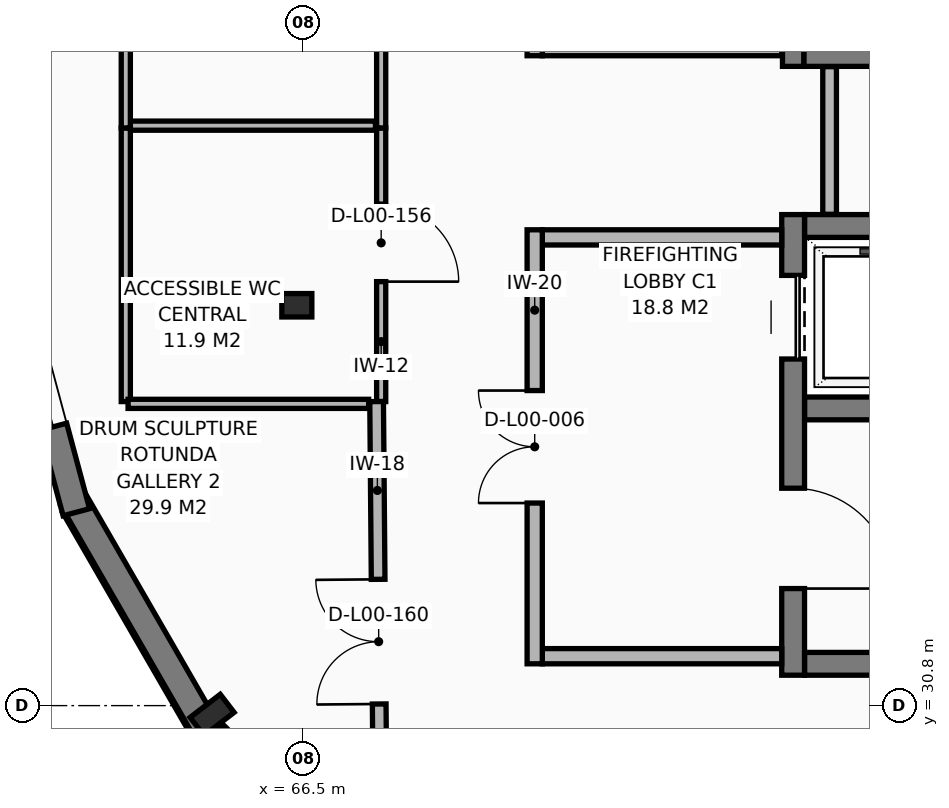
"""IFC4 building model, lengths in metres.
Left out: names, types, materials, properties, quantities, classifications, styles, units other than length and angle.
Written with IfcOpenShell. Run it as: python <this file> out.ifc"""

import sys

from ifc_helpers import new_model, si_unit, direction, frame, frame_2d, origin, origin_2d, place, context, subcontext, project, spatial, rectangle, i_section, extrude, element, fill, save


model = new_model("IFC4")
c1 = context("Model", 3, precision=1e-05, world=origin(), true_north=direction((0.0, 1.0)))
c2 = subcontext(c1, "Body", "Model", "MODEL_VIEW")
j1 = project(units=[si_unit("LENGTHUNIT", "METRE"), si_unit("PLANEANGLEUNIT", "RADIAN")], contexts=[c1])
p1 = place(None, origin())
s1 = spatial("IfcSite", under=j1, at=p1, CompositionType="ELEMENT")
p2 = place(p1, origin())
s2 = spatial("IfcBuilding", under=s1, at=p2, CompositionType="ELEMENT")
p3 = place(p2, origin())
s3 = spatial("IfcBuildingStorey", under=s2, at=p3, CompositionType="ELEMENT", Elevation=0.0)
p4 = place(p3, frame((65.305, 30.677, 0.0), z_axis=(0.0, 0.0, 1.0), x_axis=(-0.793353340291, -0.608761429009, 0.0)))
e1 = element("IfcColumn", 1, at=p4, inside=s3, PredefinedType="COLUMN", context=c2, shape_type="SweptSolid", body=[
    extrude(i_section(OverallWidth=0.3, OverallDepth=0.5, WebThickness=0.014, FlangeThickness=0.028, FilletRadius=0.027, at=origin_2d()), origin(), (0.0, 0.0, 1.0), 5.1),
])
p5 = place(p3, frame((66.42, 36.067, 0.0), z_axis=(0.0, 0.0, 1.0), x_axis=(1.0, 0.0, 0.0)))
e2 = element("IfcColumn", 2, at=p5, inside=s3, PredefinedType="COLUMN", context=c2, shape_type="SweptSolid", body=[
    extrude(i_section(OverallWidth=0.308, OverallDepth=0.395, WebThickness=0.021, FlangeThickness=0.04, FilletRadius=0.027, at=origin_2d()), origin(), (0.0, 0.0, 1.0), 5.1),
])
p6 = place(p3, frame((67.702, 28.044, 0.0), z_axis=(0.0, 0.0, 1.0), x_axis=(-0.707140892322, 0.707072668406, 0.0)))
e3 = element("IfcWall", 3, at=p6, inside=s3, PredefinedType="SOLIDWALL", context=c2, shape_type="SweptSolid", body=[
    extrude(rectangle(XDim=3.579, YDim=0.36, at=frame_2d((1.789, 0.0))), origin(), (0.0, 0.0, 1.0), 4.88),
])
p7 = place(p6, frame((1.164, 0.0, 0.85)))
e4 = element("IfcOpeningElement", 4, at=p7, cuts=e3, PredefinedType="OPENING", context=c2, shape_type="SweptSolid", body=[
    extrude(rectangle(XDim=1.25, YDim=1.7, at=frame_2d((0.625, 0.85))), frame((0.0, 0.19, 0.0), z_axis=(0.0, -1.0, 0.0), x_axis=(1.0, 0.0, 0.0)), (0.0, 0.0, 1.0), 0.38),
])
p8 = place(p3, frame((65.262, 30.419, 0.0), z_axis=(0.0, 0.0, 1.0), x_axis=(-0.500005919159, 0.866021986329, 0.0)))
e5 = element("IfcWall", 5, at=p8, inside=s3, PredefinedType="SOLIDWALL", context=c2, shape_type="SweptSolid", body=[
    extrude(rectangle(XDim=3.579, YDim=0.36, at=frame_2d((1.789, 0.0))), origin(), (0.0, 0.0, 1.0), 4.88),
])
p9 = place(p3, frame((63.519, 33.344, 0.0), z_axis=(0.0, 0.0, 1.0), x_axis=(-0.258779281586, 0.965936480014, 0.0)))
e6 = element("IfcWall", 6, at=p9, inside=s3, PredefinedType="SOLIDWALL", context=c2, shape_type="SweptSolid", body=[
    extrude(rectangle(XDim=3.578, YDim=0.36, at=frame_2d((1.789, 0.0))), origin(), (0.0, 0.0, 1.0), 4.88),
])
p10 = place(p9, frame((1.164, 0.0, 0.85)))
e7 = element("IfcOpeningElement", 7, at=p10, cuts=e6, PredefinedType="OPENING", context=c2, shape_type="SweptSolid", body=[
    extrude(rectangle(XDim=1.25, YDim=1.7, at=frame_2d((0.625, 0.85))), frame((0.0, 0.19, 0.0), z_axis=(0.0, -1.0, 0.0), x_axis=(1.0, 0.0, 0.0)), (0.0, 0.0, 1.0), 0.38),
])
for number, where, z_axis, x_axis in (
    (8, (73.1, 31.35, 0.0), (0.0, 0.0, 1.0), (1.0, 0.0, 0.0)),
    (9, (80.8, 34.71, 0.0), (0.0, 0.0, 1.0), (-1.0, 0.0, 0.0)),
):
    element("IfcWall", number, at=place(p3, frame(where, z_axis=z_axis, x_axis=x_axis)), inside=s3, PredefinedType="SHEAR", context=c2, shape_type="SweptSolid", body=[
        extrude(rectangle(XDim=7.7, YDim=0.3, at=frame_2d((3.85, 0.0))), origin(), (0.0, 0.0, 1.0), 4.88),
    ])
p11 = place(p3, frame((76.3, 37.11, 0.0), z_axis=(0.0, 0.0, 1.0), x_axis=(-1.0, 0.0, 0.0)))
e10 = element("IfcWall", 10, at=p11, inside=s3, PredefinedType="SHEAR", context=c2, shape_type="SweptSolid", body=[
    extrude(rectangle(XDim=3.2, YDim=0.3, at=frame_2d((1.6, 0.0))), origin(), (0.0, 0.0, 1.0), 4.88),
])
p12 = place(p3, frame((72.95, 37.26, 0.0), z_axis=(0.0, 0.0, 1.0), x_axis=(0.0, -1.0, 0.0)))
e11 = element("IfcWall", 11, at=p12, inside=s3, PredefinedType="SHEAR", context=c2, shape_type="SweptSolid", body=[
    extrude(rectangle(XDim=6.06, YDim=0.3, at=frame_2d((3.03, 0.0))), origin(), (0.0, 0.0, 1.0), 4.88),
])
p13 = place(p12, frame((0.8, 0.0, 0.0)))
e12 = element("IfcOpeningElement", 12, at=p13, cuts=e11, PredefinedType="OPENING", context=c2, shape_type="SweptSolid", body=[
    extrude(rectangle(XDim=1.1, YDim=2.12, at=frame_2d((0.55, 1.06))), frame((0.0, 0.16, 0.0), z_axis=(0.0, -1.0, 0.0), x_axis=(1.0, 0.0, 0.0)), (0.0, 0.0, 1.0), 0.32),
])
p14 = place(p12, frame((3.6, 0.0, 0.0)))
e13 = element("IfcOpeningElement", 13, at=p14, cuts=e11, PredefinedType="OPENING", context=c2, shape_type="SweptSolid", body=[
    extrude(rectangle(XDim=1.32, YDim=2.12, at=frame_2d((0.66, 1.06))), frame((0.0, 0.16, 0.0), z_axis=(0.0, -1.0, 0.0), x_axis=(1.0, 0.0, 0.0)), (0.0, 0.0, 1.0), 0.32),
])
p15 = place(p3, frame((69.65, 31.45, 0.0), z_axis=(0.0, 0.0, 1.0), x_axis=(1.0, 0.0, 0.0)))
e14 = element("IfcWall", 14, at=p15, inside=s3, PredefinedType="PARTITIONING", context=c2, shape_type="SweptSolid", body=[
    extrude(rectangle(XDim=3.15, YDim=0.2, at=frame_2d((1.575, 0.0))), origin(), (0.0, 0.0, 1.0), 4.27),
])
p16 = place(p3, frame((72.8, 36.96, 0.0), z_axis=(0.0, 0.0, 1.0), x_axis=(-1.0, 0.0, 0.0)))
e15 = element("IfcWall", 15, at=p16, inside=s3, PredefinedType="PARTITIONING", context=c2, shape_type="SweptSolid", body=[
    extrude(rectangle(XDim=3.15, YDim=0.2, at=frame_2d((1.575, 0.0))), origin(), (0.0, 0.0, 1.0), 4.88),
])
p17 = place(p3, frame((69.55, 31.35, 0.0), z_axis=(0.0, 0.0, 1.0), x_axis=(0.0, 1.0, 0.0)))
e16 = element("IfcWall", 16, at=p17, inside=s3, PredefinedType="PARTITIONING", context=c2, shape_type="SweptSolid", body=[
    extrude(rectangle(XDim=5.71, YDim=0.2, at=frame_2d((2.855, 0.0))), origin(), (0.0, 0.0, 1.0), 4.27),
])
p18 = place(p17, frame((2.115, 0.0, 0.0)))
e17 = element("IfcOpeningElement", 17, at=p18, cuts=e16, PredefinedType="OPENING", context=c2, shape_type="SweptSolid", body=[
    extrude(rectangle(XDim=1.48, YDim=2.15, at=frame_2d((0.74, 1.075))), frame((0.0, 0.11, 0.0), z_axis=(0.0, -1.0, 0.0), x_axis=(1.0, 0.0, 0.0)), (0.0, 0.0, 1.0), 0.22),
])
p19 = place(p3, frame((73.09, 39.35, 0.0), z_axis=(0.0, 0.0, 1.0), x_axis=(1.0, 0.0, 0.0)))
e18 = element("IfcWall", 18, at=p19, inside=s3, PredefinedType="SHEAR", context=c2, shape_type="SweptSolid", body=[
    extrude(rectangle(XDim=7.7, YDim=0.28, at=frame_2d((3.85, 0.0))), origin(), (0.0, 0.0, 1.0), 4.88),
])
p20 = place(p3, frame((72.95, 45.25, 0.0), z_axis=(0.0, 0.0, 1.0), x_axis=(0.0, -1.0, 0.0)))
e19 = element("IfcWall", 19, at=p20, inside=s3, PredefinedType="SHEAR", context=c2, shape_type="SweptSolid", body=[
    extrude(rectangle(XDim=6.04, YDim=0.28, at=frame_2d((3.02, 0.0))), origin(), (0.0, 0.0, 1.0), 4.88),
])
p21 = place(p20, frame((0.8, 0.0, 0.0)))
e20 = element("IfcOpeningElement", 20, at=p21, cuts=e19, PredefinedType="OPENING", context=c2, shape_type="SweptSolid", body=[
    extrude(rectangle(XDim=1.1, YDim=2.12, at=frame_2d((0.55, 1.06))), frame((0.0, 0.15, 0.0), z_axis=(0.0, -1.0, 0.0), x_axis=(1.0, 0.0, 0.0)), (0.0, 0.0, 1.0), 0.3),
])
p22 = place(p20, frame((3.6, 0.0, 0.0)))
e21 = element("IfcOpeningElement", 21, at=p22, cuts=e19, PredefinedType="OPENING", context=c2, shape_type="SweptSolid", body=[
    extrude(rectangle(XDim=1.32, YDim=2.12, at=frame_2d((0.66, 1.06))), frame((0.0, 0.15, 0.0), z_axis=(0.0, -1.0, 0.0), x_axis=(1.0, 0.0, 0.0)), (0.0, 0.0, 1.0), 0.3),
])
p23 = place(p3, frame((69.65, 39.45, 0.0), z_axis=(0.0, 0.0, 1.0), x_axis=(1.0, 0.0, 0.0)))
e22 = element("IfcWall", 22, at=p23, inside=s3, PredefinedType="PARTITIONING", context=c2, shape_type="SweptSolid", body=[
    extrude(rectangle(XDim=3.15, YDim=0.2, at=frame_2d((1.575, 0.0))), origin(), (0.0, 0.0, 1.0), 4.88),
])
p24 = place(p3, frame((69.55, 39.35, 0.0), z_axis=(0.0, 0.0, 1.0), x_axis=(0.0, 1.0, 0.0)))
e23 = element("IfcWall", 23, at=p24, inside=s3, PredefinedType="PARTITIONING", context=c2, shape_type="SweptSolid", body=[
    extrude(rectangle(XDim=5.71, YDim=0.2, at=frame_2d((2.855, 0.0))), origin(), (0.0, 0.0, 1.0), 4.27),
])
p25 = place(p24, frame((2.115, 0.0, 0.0)))
e24 = element("IfcOpeningElement", 24, at=p25, cuts=e23, PredefinedType="OPENING", context=c2, shape_type="SweptSolid", body=[
    extrude(rectangle(XDim=1.48, YDim=2.15, at=frame_2d((0.74, 1.075))), frame((0.0, 0.11, 0.0), z_axis=(0.0, -1.0, 0.0), x_axis=(1.0, 0.0, 0.0)), (0.0, 0.0, 1.0), 0.22),
])
p26 = place(p3, frame((67.53, 38.4, 0.0), z_axis=(0.0, 0.0, 1.0), x_axis=(0.0, -1.0, 0.0)))
e25 = element("IfcWall", 25, at=p26, inside=s3, PredefinedType="PARTITIONING", context=c2, shape_type="SweptSolid", body=[
    extrude(rectangle(XDim=3.6, YDim=0.12, at=frame_2d((1.8, 0.0))), origin(), (0.0, 0.0, 1.0), 4.27),
])
p27 = place(p26, frame((1.002, 0.0, 0.0)))
e26 = element("IfcOpeningElement", 26, at=p27, cuts=e25, PredefinedType="OPENING", context=c2, shape_type="SweptSolid", body=[
    extrude(rectangle(XDim=1.02, YDim=2.12, at=frame_2d((0.51, 1.06))), frame((0.0, 0.07, 0.0), z_axis=(0.0, -1.0, 0.0), x_axis=(1.0, 0.0, 0.0)), (0.0, 0.0, 1.0), 0.14),
])
p28 = place(p3, frame((67.53, 42.0, 0.0), z_axis=(0.0, 0.0, 1.0), x_axis=(0.0, -1.0, 0.0)))
e27 = element("IfcWall", 27, at=p28, inside=s3, PredefinedType="PARTITIONING", context=c2, shape_type="SweptSolid", body=[
    extrude(rectangle(XDim=3.6, YDim=0.12, at=frame_2d((1.8, 0.0))), origin(), (0.0, 0.0, 1.0), 4.27),
])
p29 = place(p28, frame((1.32, 0.0, 0.0)))
e28 = element("IfcOpeningElement", 28, at=p29, cuts=e27, PredefinedType="OPENING", context=c2, shape_type="SweptSolid", body=[
    extrude(rectangle(XDim=0.96, YDim=2.1, at=frame_2d((0.48, 1.05))), frame((0.0, 0.07, 0.0), z_axis=(0.0, -1.0, 0.0), x_axis=(1.0, 0.0, 0.0)), (0.0, 0.0, 1.0), 0.14),
])
p30 = place(p3, frame((73.43, 39.206, 0.0), z_axis=(0.0, 0.0, 1.0), x_axis=(0.0, -1.0, 0.0)))
e29 = element("IfcWall", 29, at=p30, inside=s3, PredefinedType="PARTITIONING", context=c2, shape_type="SweptSolid", body=[
    extrude(rectangle(XDim=1.942, YDim=0.18, at=frame_2d((0.971, 0.0))), origin(), (0.0, 0.0, 1.0), 4.87),
])
p31 = place(p3, frame((67.524, 28.483, 0.0), z_axis=(0.0, 0.0, 1.0), x_axis=(-0.008540751285, 0.999963527119, 0.0)))
e30 = element("IfcWall", 30, at=p31, inside=s3, PredefinedType="PARTITIONING", context=c2, shape_type="SweptSolid", body=[
    extrude(rectangle(XDim=6.317, YDim=0.18, at=frame_2d((3.159, 0.0))), origin(), (0.0, 0.0, 1.0), 4.27),
])
p32 = place(p31, frame((2.339, 0.0, 0.0)))
e31 = element("IfcOpeningElement", 31, at=p32, cuts=e30, PredefinedType="OPENING", context=c2, shape_type="SweptSolid", body=[
    extrude(rectangle(XDim=1.64, YDim=2.2, at=frame_2d((0.82, 1.1))), frame((0.0, 0.1, 0.0), z_axis=(0.0, -1.0, 0.0), x_axis=(1.0, 0.0, 0.0)), (0.0, 0.0, 1.0), 0.2),
])
p33 = place(p3, frame((64.2, 38.43, 0.0), z_axis=(0.0, 0.0, 1.0), x_axis=(1.0, 0.0, 0.0)))
e32 = element("IfcWall", 32, at=p33, inside=s3, PredefinedType="PARTITIONING", context=c2, shape_type="SweptSolid", body=[
    extrude(rectangle(XDim=3.255, YDim=0.12, at=frame_2d((1.627, 0.0))), origin(), (0.0, 0.0, 1.0), 4.27),
])
p34 = place(p3, frame((64.17, 34.8, 0.0), z_axis=(0.0, 0.0, 1.0), x_axis=(0.0, 1.0, 0.0)))
e33 = element("IfcWall", 33, at=p34, inside=s3, PredefinedType="PARTITIONING", context=c2, shape_type="SweptSolid", body=[
    extrude(rectangle(XDim=3.6, YDim=0.12, at=frame_2d((1.8, 0.0))), origin(), (0.0, 0.0, 1.0), 4.42),
])
p35 = place(p3, frame((67.365, 34.77, 0.0), z_axis=(0.0, 0.0, 1.0), x_axis=(-1.0, 0.0, 0.0)))
e34 = element("IfcWall", 34, at=p35, inside=s3, PredefinedType="PARTITIONING", context=c2, shape_type="SweptSolid", body=[
    extrude(rectangle(XDim=3.165, YDim=0.12, at=frame_2d((1.583, 0.0))), origin(), (0.0, 0.0, 1.0), 4.27),
])
p36 = place(p3, frame((64.17, 38.4, 0.0), z_axis=(0.0, 0.0, 1.0), x_axis=(0.0, 1.0, 0.0)))
e35 = element("IfcWall", 35, at=p36, inside=s3, PredefinedType="PARTITIONING", context=c2, shape_type="SweptSolid", body=[
    extrude(rectangle(XDim=3.6, YDim=0.12, at=frame_2d((1.8, 0.0))), origin(), (0.0, 0.0, 1.0), 4.87),
])
p37 = place(p10, origin())
e36 = element("IfcWindow", 36, at=p37, inside=s3, PartitioningType="SINGLE_PANEL", PredefinedType="WINDOW", context=c2, shape_type="SweptSolid", body=[
    extrude(rectangle(XDim=1.25, YDim=1.7, at=frame_2d((0.625, 0.85))), frame((0.0, 0.03, 0.0), z_axis=(0.0, -1.0, 0.0), x_axis=(1.0, 0.0, 0.0)), (0.0, 0.0, 1.0), 0.06),
])
fill(e7, e36)
p38 = place(p13, origin())
e37 = element("IfcDoor", 37, at=p38, inside=s3, OperationType="SLIDING_TO_LEFT", PredefinedType="DOOR", context=c2, shape_type="SweptSolid", body=[
    extrude(rectangle(XDim=1.1, YDim=2.12, at=frame_2d((0.55, 1.06))), frame((0.0, 0.025, 0.0), z_axis=(0.0, -1.0, 0.0), x_axis=(1.0, 0.0, 0.0)), (0.0, 0.0, 1.0), 0.05),
])
fill(e12, e37)
p39 = place(p14, origin())
e38 = element("IfcDoor", 38, at=p39, inside=s3, OperationType="SINGLE_SWING_RIGHT", PredefinedType="DOOR", context=c2, shape_type="SweptSolid", body=[
    extrude(rectangle(XDim=1.32, YDim=2.12, at=frame_2d((0.66, 1.06))), frame((0.0, 0.025, 0.0), z_axis=(0.0, -1.0, 0.0), x_axis=(1.0, 0.0, 0.0)), (0.0, 0.0, 1.0), 0.05),
])
fill(e13, e38)
p40 = place(p18, origin())
e39 = element("IfcDoor", 39, at=p40, inside=s3, OperationType="DOUBLE_DOOR_SINGLE_SWING", PredefinedType="DOOR", context=c2, shape_type="SweptSolid", body=[
    extrude(rectangle(XDim=1.48, YDim=2.15, at=frame_2d((0.74, 1.075))), frame((0.0, 0.025, 0.0), z_axis=(0.0, -1.0, 0.0), x_axis=(1.0, 0.0, 0.0)), (0.0, 0.0, 1.0), 0.05),
])
fill(e17, e39)
p41 = place(p27, origin())
e40 = element("IfcDoor", 40, at=p41, inside=s3, OperationType="SINGLE_SWING_RIGHT", PredefinedType="DOOR", context=c2, shape_type="SweptSolid", body=[
    extrude(rectangle(XDim=1.02, YDim=2.12, at=frame_2d((0.51, 1.06))), frame((0.0, 0.025, 0.0), z_axis=(0.0, -1.0, 0.0), x_axis=(1.0, 0.0, 0.0)), (0.0, 0.0, 1.0), 0.05),
])
fill(e26, e40)
p42 = place(p32, origin())
e41 = element("IfcDoor", 41, at=p42, inside=s3, OperationType="DOUBLE_DOOR_SINGLE_SWING", PredefinedType="DOOR", context=c2, shape_type="SweptSolid", body=[
    extrude(rectangle(XDim=1.64, YDim=2.2, at=frame_2d((0.82, 1.1))), frame((0.0, 0.025, 0.0), z_axis=(0.0, -1.0, 0.0), x_axis=(1.0, 0.0, 0.0)), (0.0, 0.0, 1.0), 0.05),
])
fill(e31, e41)
save(model, sys.argv[1])
